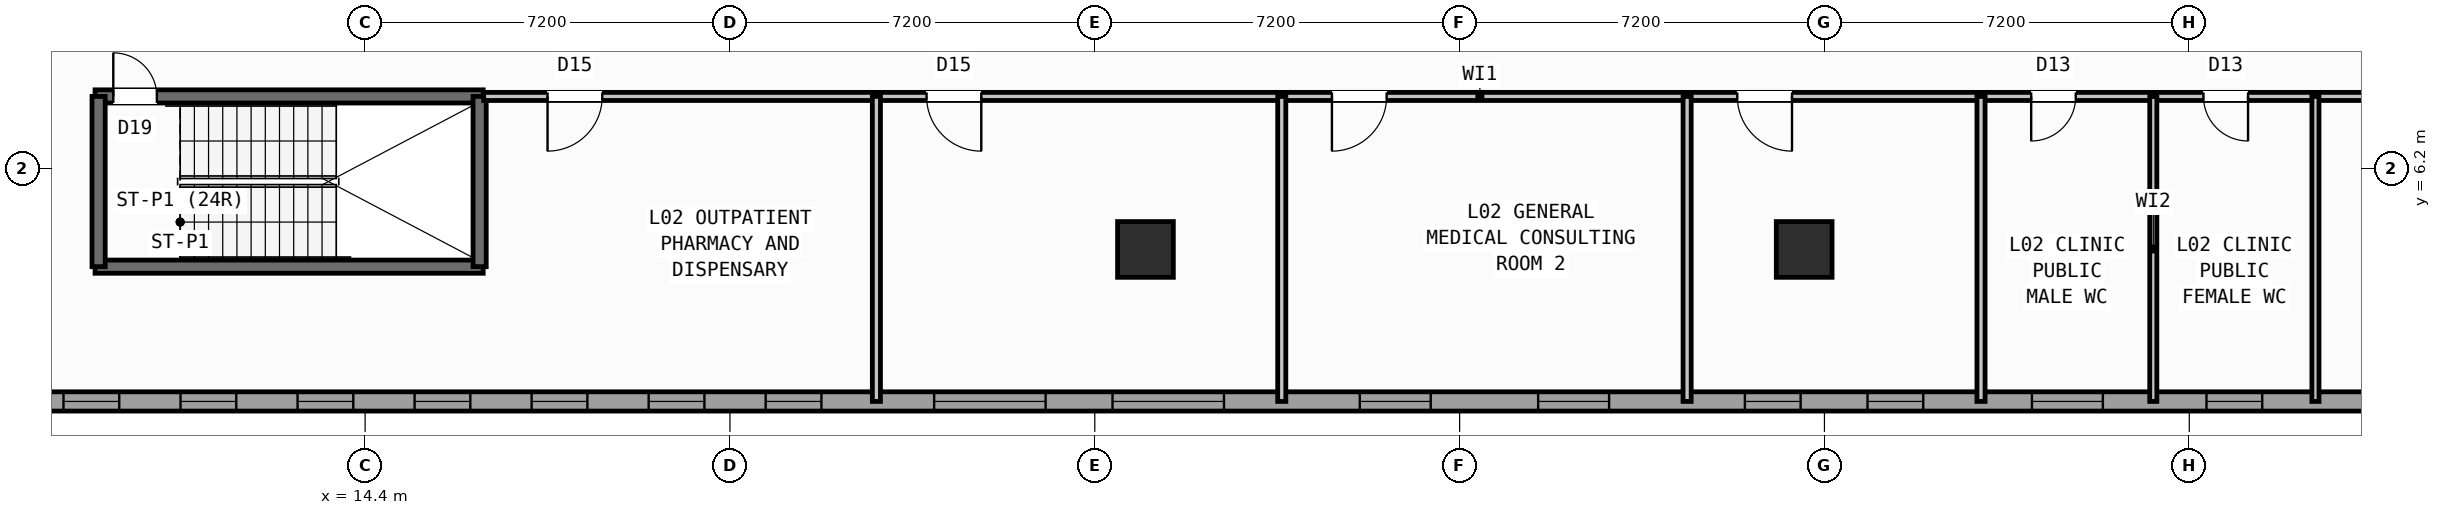
"""IFC4 building model, lengths in metres.
Left out: names, types, materials, properties, quantities, classifications, styles, units other than length and angle.
Written with IfcOpenShell. Run it as: python <this file> out.ifc"""

import sys

from ifc_helpers import new_model, si_unit, direction, frame, frame_2d, origin, origin_2d, place, context, subcontext, project, spatial, rectangle, hollow_rectangle, extrude, source, transform, mapped, element, fill, save


model = new_model("IFC4")
c1 = context("Model", 3, precision=1e-05, world=origin(), true_north=direction((0.0, 1.0)))
c2 = subcontext(c1, "Body", "Model", "MODEL_VIEW")
j1 = project(units=[si_unit("LENGTHUNIT", "METRE"), si_unit("PLANEANGLEUNIT", "RADIAN")], contexts=[c1])
p1 = place(None, origin())
s1 = spatial("IfcSite", under=j1, at=p1, CompositionType="ELEMENT")
p2 = place(p1, origin())
s2 = spatial("IfcBuilding", under=s1, at=p2, CompositionType="ELEMENT")
p3 = place(p2, frame((0.0, 0.0, 10.2)))
s3 = spatial("IfcBuildingStorey", under=s2, at=p3, CompositionType="ELEMENT", Elevation=10.2)
m1 = source(origin(), c2, "Body", "SweptSolid", [
    extrude(hollow_rectangle(XDim=1.1, YDim=1.1, WallThickness=0.04, at=origin_2d()), origin(), (0.0, 0.0, 1.0), 4.2),
])
for number, where, z_axis, x_axis in (
    (1, (29.8, 4.6, 0.0), (0.0, 0.0, 1.0), (1.0, 0.0, 0.0)),
    (2, (42.8, 4.6, 0.0), (0.0, 0.0, 1.0), (1.0, 0.0, 0.0)),
):
    element("IfcColumn", number, at=place(p3, frame(where, z_axis=z_axis, x_axis=x_axis)), inside=s3, PredefinedType="COLUMN", context=c2, shape_type="MappedRepresentation", body=[
        mapped(m1, transform((0.0, 0.0, 0.0), scale=1.0)),
    ])
p4 = place(p3, frame((67.117, 1.6, 0.0), z_axis=(0.0, 0.0, 1.0), x_axis=(-1.0, 0.0, 0.0)))
e3 = element("IfcWall", 3, at=p4, inside=s3, PredefinedType="STANDARD", context=c2, shape_type="SweptSolid", body=[
    extrude(rectangle(XDim=62.234, YDim=0.38, at=frame_2d((31.117, 0.0))), origin(), (0.0, 0.0, 1.0), 3.85),
])
p5 = place(p4, frame((1.735, 0.0, 0.85)))
e4 = element("IfcOpeningElement", 4, at=p5, cuts=e3, PredefinedType="OPENING", context=c2, shape_type="SweptSolid", body=[
    extrude(rectangle(XDim=2.2, YDim=1.75, at=frame_2d((1.1, 0.875))), frame((0.0, 0.2, 0.0), z_axis=(0.0, -1.0, 0.0), x_axis=(1.0, 0.0, 0.0)), (0.0, 0.0, 1.0), 0.4),
])
p6 = place(p4, frame((6.104, 0.0, 0.85)))
e5 = element("IfcOpeningElement", 5, at=p6, cuts=e3, PredefinedType="OPENING", context=c2, shape_type="SweptSolid", body=[
    extrude(rectangle(XDim=2.2, YDim=1.75, at=frame_2d((1.1, 0.875))), frame((0.0, 0.2, 0.0), z_axis=(0.0, -1.0, 0.0), x_axis=(1.0, 0.0, 0.0)), (0.0, 0.0, 1.0), 0.4),
])
p7 = place(p4, frame((10.473, 0.0, 0.85)))
e6 = element("IfcOpeningElement", 6, at=p7, cuts=e3, PredefinedType="OPENING", context=c2, shape_type="SweptSolid", body=[
    extrude(rectangle(XDim=2.2, YDim=1.75, at=frame_2d((1.1, 0.875))), frame((0.0, 0.2, 0.0), z_axis=(0.0, -1.0, 0.0), x_axis=(1.0, 0.0, 0.0)), (0.0, 0.0, 1.0), 0.4),
])
p8 = place(p4, frame((15.277, 0.0, 1.0)))
e7 = element("IfcOpeningElement", 7, at=p8, cuts=e3, PredefinedType="OPENING", context=c2, shape_type="SweptSolid", body=[
    extrude(rectangle(XDim=1.1, YDim=1.35, at=frame_2d((0.55, 0.675))), frame((0.0, 0.2, 0.0), z_axis=(0.0, -1.0, 0.0), x_axis=(1.0, 0.0, 0.0)), (0.0, 0.0, 1.0), 0.4),
])
p9 = place(p4, frame((18.422, 0.0, 0.95)))
e8 = element("IfcOpeningElement", 8, at=p9, cuts=e3, PredefinedType="OPENING", context=c2, shape_type="SweptSolid", body=[
    extrude(rectangle(XDim=1.4, YDim=1.5, at=frame_2d((0.7, 0.75))), frame((0.0, 0.2, 0.0), z_axis=(0.0, -1.0, 0.0), x_axis=(1.0, 0.0, 0.0)), (0.0, 0.0, 1.0), 0.4),
])
p10 = place(p4, frame((21.967, 0.0, 1.0)))
e9 = element("IfcOpeningElement", 9, at=p10, cuts=e3, PredefinedType="OPENING", context=c2, shape_type="SweptSolid", body=[
    extrude(rectangle(XDim=1.1, YDim=1.35, at=frame_2d((0.55, 0.675))), frame((0.0, 0.2, 0.0), z_axis=(0.0, -1.0, 0.0), x_axis=(1.0, 0.0, 0.0)), (0.0, 0.0, 1.0), 0.4),
])
p11 = place(p4, frame((24.387, 0.0, 1.0)))
e10 = element("IfcOpeningElement", 10, at=p11, cuts=e3, PredefinedType="OPENING", context=c2, shape_type="SweptSolid", body=[
    extrude(rectangle(XDim=1.1, YDim=1.35, at=frame_2d((0.55, 0.675))), frame((0.0, 0.2, 0.0), z_axis=(0.0, -1.0, 0.0), x_axis=(1.0, 0.0, 0.0)), (0.0, 0.0, 1.0), 0.4),
])
p12 = place(p4, frame((28.167, 0.0, 0.95)))
e11 = element("IfcOpeningElement", 11, at=p12, cuts=e3, PredefinedType="OPENING", context=c2, shape_type="SweptSolid", body=[
    extrude(rectangle(XDim=1.4, YDim=1.5, at=frame_2d((0.7, 0.75))), frame((0.0, 0.2, 0.0), z_axis=(0.0, -1.0, 0.0), x_axis=(1.0, 0.0, 0.0)), (0.0, 0.0, 1.0), 0.4),
])
p13 = place(p4, frame((31.687, 0.0, 0.95)))
e12 = element("IfcOpeningElement", 12, at=p13, cuts=e3, PredefinedType="OPENING", context=c2, shape_type="SweptSolid", body=[
    extrude(rectangle(XDim=1.4, YDim=1.5, at=frame_2d((0.7, 0.75))), frame((0.0, 0.2, 0.0), z_axis=(0.0, -1.0, 0.0), x_axis=(1.0, 0.0, 0.0)), (0.0, 0.0, 1.0), 0.4),
])
p14 = place(p4, frame((35.767, 0.0, 0.85)))
e13 = element("IfcOpeningElement", 13, at=p14, cuts=e3, PredefinedType="OPENING", context=c2, shape_type="SweptSolid", body=[
    extrude(rectangle(XDim=2.2, YDim=1.75, at=frame_2d((1.1, 0.875))), frame((0.0, 0.2, 0.0), z_axis=(0.0, -1.0, 0.0), x_axis=(1.0, 0.0, 0.0)), (0.0, 0.0, 1.0), 0.4),
])
p15 = place(p4, frame((39.287, 0.0, 0.85)))
e14 = element("IfcOpeningElement", 14, at=p15, cuts=e3, PredefinedType="OPENING", context=c2, shape_type="SweptSolid", body=[
    extrude(rectangle(XDim=2.2, YDim=1.75, at=frame_2d((1.1, 0.875))), frame((0.0, 0.2, 0.0), z_axis=(0.0, -1.0, 0.0), x_axis=(1.0, 0.0, 0.0)), (0.0, 0.0, 1.0), 0.4),
])
p16 = place(p4, frame((43.712, 0.0, 1.0)))
e15 = element("IfcOpeningElement", 15, at=p16, cuts=e3, PredefinedType="OPENING", context=c2, shape_type="SweptSolid", body=[
    extrude(rectangle(XDim=1.1, YDim=1.35, at=frame_2d((0.55, 0.675))), frame((0.0, 0.2, 0.0), z_axis=(0.0, -1.0, 0.0), x_axis=(1.0, 0.0, 0.0)), (0.0, 0.0, 1.0), 0.4),
])
p17 = place(p4, frame((46.021, 0.0, 1.0)))
e16 = element("IfcOpeningElement", 16, at=p17, cuts=e3, PredefinedType="OPENING", context=c2, shape_type="SweptSolid", body=[
    extrude(rectangle(XDim=1.1, YDim=1.35, at=frame_2d((0.55, 0.675))), frame((0.0, 0.2, 0.0), z_axis=(0.0, -1.0, 0.0), x_axis=(1.0, 0.0, 0.0)), (0.0, 0.0, 1.0), 0.4),
])
p18 = place(p4, frame((48.331, 0.0, 1.0)))
e17 = element("IfcOpeningElement", 17, at=p18, cuts=e3, PredefinedType="OPENING", context=c2, shape_type="SweptSolid", body=[
    extrude(rectangle(XDim=1.1, YDim=1.35, at=frame_2d((0.55, 0.675))), frame((0.0, 0.2, 0.0), z_axis=(0.0, -1.0, 0.0), x_axis=(1.0, 0.0, 0.0)), (0.0, 0.0, 1.0), 0.4),
])
p19 = place(p4, frame((50.641, 0.0, 1.0)))
e18 = element("IfcOpeningElement", 18, at=p19, cuts=e3, PredefinedType="OPENING", context=c2, shape_type="SweptSolid", body=[
    extrude(rectangle(XDim=1.1, YDim=1.35, at=frame_2d((0.55, 0.675))), frame((0.0, 0.2, 0.0), z_axis=(0.0, -1.0, 0.0), x_axis=(1.0, 0.0, 0.0)), (0.0, 0.0, 1.0), 0.4),
])
p20 = place(p4, frame((52.951, 0.0, 1.0)))
e19 = element("IfcOpeningElement", 19, at=p20, cuts=e3, PredefinedType="OPENING", context=c2, shape_type="SweptSolid", body=[
    extrude(rectangle(XDim=1.1, YDim=1.35, at=frame_2d((0.55, 0.675))), frame((0.0, 0.2, 0.0), z_axis=(0.0, -1.0, 0.0), x_axis=(1.0, 0.0, 0.0)), (0.0, 0.0, 1.0), 0.4),
])
p21 = place(p4, frame((55.26, 0.0, 1.0)))
e20 = element("IfcOpeningElement", 20, at=p21, cuts=e3, PredefinedType="OPENING", context=c2, shape_type="SweptSolid", body=[
    extrude(rectangle(XDim=1.1, YDim=1.35, at=frame_2d((0.55, 0.675))), frame((0.0, 0.2, 0.0), z_axis=(0.0, -1.0, 0.0), x_axis=(1.0, 0.0, 0.0)), (0.0, 0.0, 1.0), 0.4),
])
p22 = place(p4, frame((57.57, 0.0, 1.0)))
e21 = element("IfcOpeningElement", 21, at=p22, cuts=e3, PredefinedType="OPENING", context=c2, shape_type="SweptSolid", body=[
    extrude(rectangle(XDim=1.1, YDim=1.35, at=frame_2d((0.55, 0.675))), frame((0.0, 0.2, 0.0), z_axis=(0.0, -1.0, 0.0), x_axis=(1.0, 0.0, 0.0)), (0.0, 0.0, 1.0), 0.4),
])
p23 = place(p4, frame((59.879, 0.0, 1.0)))
e22 = element("IfcOpeningElement", 22, at=p23, cuts=e3, PredefinedType="OPENING", context=c2, shape_type="SweptSolid", body=[
    extrude(rectangle(XDim=1.1, YDim=1.35, at=frame_2d((0.55, 0.675))), frame((0.0, 0.2, 0.0), z_axis=(0.0, -1.0, 0.0), x_axis=(1.0, 0.0, 0.0)), (0.0, 0.0, 1.0), 0.4),
])
p24 = place(p3, frame((9.07, 7.62, 0.0), z_axis=(0.0, 0.0, 1.0), x_axis=(1.0, 0.0, 0.0)))
e23 = element("IfcWall", 23, at=p24, inside=s3, PredefinedType="SHEAR", context=c2, shape_type="SweptSolid", body=[
    extrude(rectangle(XDim=7.66, YDim=0.26, at=frame_2d((3.83, 0.0))), origin(), (0.0, 0.0, 1.0), 4.0),
])
p25 = place(p24, frame((0.36, 0.0, 0.0)))
e24 = element("IfcOpeningElement", 24, at=p25, cuts=e23, PredefinedType="OPENING", context=c2, shape_type="SweptSolid", body=[
    extrude(rectangle(XDim=0.86, YDim=2.05, at=frame_2d((0.43, 1.025))), frame((0.0, 0.14, 0.0), z_axis=(0.0, -1.0, 0.0), x_axis=(1.0, 0.0, 0.0)), (0.0, 0.0, 1.0), 0.28),
])
p26 = place(p3, frame((9.07, 4.26, 0.0), z_axis=(0.0, 0.0, 1.0), x_axis=(1.0, 0.0, 0.0)))
e25 = element("IfcWall", 25, at=p26, inside=s3, PredefinedType="SHEAR", context=c2, shape_type="SweptSolid", body=[
    extrude(rectangle(XDim=7.66, YDim=0.26, at=frame_2d((3.83, 0.0))), origin(), (0.0, 0.0, 1.0), 4.0),
])
for number, where, z_axis, x_axis in (
    (26, (9.14, 4.26, 0.0), (0.0, 0.0, 1.0), (0.0, 1.0, 0.0)),
    (27, (16.66, 4.26, 0.0), (0.0, 0.0, 1.0), (0.0, 1.0, 0.0)),
):
    element("IfcWall", number, at=place(p3, frame(where, z_axis=z_axis, x_axis=x_axis)), inside=s3, PredefinedType="SHEAR", context=c2, shape_type="SweptSolid", body=[
        extrude(rectangle(XDim=3.36, YDim=0.26, at=frame_2d((1.68, 0.0))), origin(), (0.0, 0.0, 1.0), 4.0),
    ])
p27 = place(p3, frame((16.74, 7.62, 0.0), z_axis=(0.0, 0.0, 1.0), x_axis=(1.0, 0.0, 0.0)))
e28 = element("IfcWall", 28, at=p27, inside=s3, PredefinedType="PARTITIONING", context=c2, shape_type="SweptSolid", body=[
    extrude(rectangle(XDim=39.32, YDim=0.16, at=frame_2d((19.66, 0.0))), origin(), (0.0, 0.0, 1.0), 3.84),
])
p28 = place(p27, frame((1.26, 0.0, 0.0)))
e29 = element("IfcOpeningElement", 29, at=p28, cuts=e28, PredefinedType="OPENING", context=c2, shape_type="SweptSolid", body=[
    extrude(rectangle(XDim=1.08, YDim=2.15, at=frame_2d((0.54, 1.075))), frame((0.0, 0.09, 0.0), z_axis=(0.0, -1.0, 0.0), x_axis=(1.0, 0.0, 0.0)), (0.0, 0.0, 1.0), 0.18),
])
p29 = place(p27, frame((8.74, 0.0, 0.0)))
e30 = element("IfcOpeningElement", 30, at=p29, cuts=e28, PredefinedType="OPENING", context=c2, shape_type="SweptSolid", body=[
    extrude(rectangle(XDim=1.08, YDim=2.15, at=frame_2d((0.54, 1.075))), frame((0.0, 0.09, 0.0), z_axis=(0.0, -1.0, 0.0), x_axis=(1.0, 0.0, 0.0)), (0.0, 0.0, 1.0), 0.18),
])
p30 = place(p27, frame((16.74, 0.0, 0.0)))
e31 = element("IfcOpeningElement", 31, at=p30, cuts=e28, PredefinedType="OPENING", context=c2, shape_type="SweptSolid", body=[
    extrude(rectangle(XDim=1.08, YDim=2.15, at=frame_2d((0.54, 1.075))), frame((0.0, 0.09, 0.0), z_axis=(0.0, -1.0, 0.0), x_axis=(1.0, 0.0, 0.0)), (0.0, 0.0, 1.0), 0.18),
])
p31 = place(p27, frame((24.74, 0.0, 0.0)))
e32 = element("IfcOpeningElement", 32, at=p31, cuts=e28, PredefinedType="OPENING", context=c2, shape_type="SweptSolid", body=[
    extrude(rectangle(XDim=1.08, YDim=2.15, at=frame_2d((0.54, 1.075))), frame((0.0, 0.09, 0.0), z_axis=(0.0, -1.0, 0.0), x_axis=(1.0, 0.0, 0.0)), (0.0, 0.0, 1.0), 0.18),
])
p32 = place(p27, frame((30.54, 0.0, 0.0)))
e33 = element("IfcOpeningElement", 33, at=p32, cuts=e28, PredefinedType="OPENING", context=c2, shape_type="SweptSolid", body=[
    extrude(rectangle(XDim=0.88, YDim=2.08, at=frame_2d((0.44, 1.04))), frame((0.0, 0.09, 0.0), z_axis=(0.0, -1.0, 0.0), x_axis=(1.0, 0.0, 0.0)), (0.0, 0.0, 1.0), 0.18),
])
p33 = place(p27, frame((33.94, 0.0, 0.0)))
e34 = element("IfcOpeningElement", 34, at=p33, cuts=e28, PredefinedType="OPENING", context=c2, shape_type="SweptSolid", body=[
    extrude(rectangle(XDim=0.88, YDim=2.08, at=frame_2d((0.44, 1.04))), frame((0.0, 0.09, 0.0), z_axis=(0.0, -1.0, 0.0), x_axis=(1.0, 0.0, 0.0)), (0.0, 0.0, 1.0), 0.18),
])
p34 = place(p27, frame((37.14, 0.0, 0.0)))
e35 = element("IfcOpeningElement", 35, at=p34, cuts=e28, PredefinedType="OPENING", context=c2, shape_type="SweptSolid", body=[
    extrude(rectangle(XDim=0.96, YDim=2.08, at=frame_2d((0.48, 1.04))), frame((0.0, 0.09, 0.0), z_axis=(0.0, -1.0, 0.0), x_axis=(1.0, 0.0, 0.0)), (0.0, 0.0, 1.0), 0.18),
])
for number, where, z_axis, x_axis in (
    (36, (24.49, 1.6, 0.0), (0.0, 0.0, 1.0), (0.0, 1.0, 0.0)),
    (37, (32.49, 1.6, 0.0), (0.0, 0.0, 1.0), (0.0, 1.0, 0.0)),
    (38, (40.49, 1.6, 0.0), (0.0, 0.0, 1.0), (0.0, 1.0, 0.0)),
    (39, (46.29, 1.6, 0.0), (0.0, 0.0, 1.0), (0.0, 1.0, 0.0)),
):
    element("IfcWall", number, at=place(p3, frame(where, z_axis=z_axis, x_axis=x_axis)), inside=s3, PredefinedType="PARTITIONING", context=c2, shape_type="SweptSolid", body=[
        extrude(rectangle(XDim=6.02, YDim=0.16, at=frame_2d((3.01, 0.0))), origin(), (0.0, 0.0, 1.0), 3.84),
    ])
for number, where, z_axis, x_axis in (
    (40, (49.69, 1.6, 0.0), (0.0, 0.0, 1.0), (0.0, 1.0, 0.0)),
    (41, (52.89, 1.6, 0.0), (0.0, 0.0, 1.0), (0.0, 1.0, 0.0)),
):
    element("IfcWall", number, at=place(p3, frame(where, z_axis=z_axis, x_axis=x_axis)), inside=s3, PredefinedType="PLUMBINGWALL", context=c2, shape_type="SweptSolid", body=[
        extrude(rectangle(XDim=6.02, YDim=0.14, at=frame_2d((3.01, 0.0))), origin(), (0.0, 0.0, 1.0), 3.84),
    ])
m2 = source(origin(), c2, "Body", "SweptSolid", [
    extrude(rectangle(XDim=1.1, YDim=1.35, at=frame_2d((0.55, 0.675))), frame((0.0, 0.03, 0.0), z_axis=(0.0, -1.0, 0.0), x_axis=(1.0, 0.0, 0.0)), (0.0, 0.0, 1.0), 0.06),
])
p35 = place(p8, origin())
e42 = element("IfcWindow", 42, at=p35, inside=s3, PartitioningType="SINGLE_PANEL", PredefinedType="WINDOW", context=c2, shape_type="MappedRepresentation", body=[
    mapped(m2, transform((0.0, 0.0, 0.0), scale=1.0)),
])
fill(e7, e42)
m3 = source(origin(), c2, "Body", "SweptSolid", [
    extrude(rectangle(XDim=1.4, YDim=1.5, at=frame_2d((0.7, 0.75))), frame((0.0, 0.03, 0.0), z_axis=(0.0, -1.0, 0.0), x_axis=(1.0, 0.0, 0.0)), (0.0, 0.0, 1.0), 0.06),
])
p36 = place(p9, origin())
e43 = element("IfcWindow", 43, at=p36, inside=s3, PartitioningType="SINGLE_PANEL", PredefinedType="WINDOW", context=c2, shape_type="MappedRepresentation", body=[
    mapped(m3, transform((0.0, 0.0, 0.0), scale=1.0)),
])
fill(e8, e43)
p37 = place(p10, origin())
e44 = element("IfcWindow", 44, at=p37, inside=s3, PartitioningType="SINGLE_PANEL", PredefinedType="WINDOW", context=c2, shape_type="MappedRepresentation", body=[
    mapped(m2, transform((0.0, 0.0, 0.0), scale=1.0)),
])
fill(e9, e44)
p38 = place(p11, origin())
e45 = element("IfcWindow", 45, at=p38, inside=s3, PartitioningType="SINGLE_PANEL", PredefinedType="WINDOW", context=c2, shape_type="MappedRepresentation", body=[
    mapped(m2, transform((0.0, 0.0, 0.0), scale=1.0)),
])
fill(e10, e45)
p39 = place(p12, origin())
e46 = element("IfcWindow", 46, at=p39, inside=s3, PartitioningType="SINGLE_PANEL", PredefinedType="WINDOW", context=c2, shape_type="MappedRepresentation", body=[
    mapped(m3, transform((0.0, 0.0, 0.0), scale=1.0)),
])
fill(e11, e46)
p40 = place(p13, origin())
e47 = element("IfcWindow", 47, at=p40, inside=s3, PartitioningType="SINGLE_PANEL", PredefinedType="WINDOW", context=c2, shape_type="MappedRepresentation", body=[
    mapped(m3, transform((0.0, 0.0, 0.0), scale=1.0)),
])
fill(e12, e47)
m4 = source(origin(), c2, "Body", "SweptSolid", [
    extrude(rectangle(XDim=2.2, YDim=1.75, at=frame_2d((1.1, 0.875))), frame((0.0, 0.03, 0.0), z_axis=(0.0, -1.0, 0.0), x_axis=(1.0, 0.0, 0.0)), (0.0, 0.0, 1.0), 0.06),
])
p41 = place(p14, origin())
e48 = element("IfcWindow", 48, at=p41, inside=s3, PartitioningType="SINGLE_PANEL", PredefinedType="WINDOW", context=c2, shape_type="MappedRepresentation", body=[
    mapped(m4, transform((0.0, 0.0, 0.0), scale=1.0)),
])
fill(e13, e48)
p42 = place(p15, origin())
e49 = element("IfcWindow", 49, at=p42, inside=s3, PartitioningType="SINGLE_PANEL", PredefinedType="WINDOW", context=c2, shape_type="MappedRepresentation", body=[
    mapped(m4, transform((0.0, 0.0, 0.0), scale=1.0)),
])
fill(e14, e49)
p43 = place(p16, origin())
e50 = element("IfcWindow", 50, at=p43, inside=s3, PartitioningType="SINGLE_PANEL", PredefinedType="WINDOW", context=c2, shape_type="MappedRepresentation", body=[
    mapped(m2, transform((0.0, 0.0, 0.0), scale=1.0)),
])
fill(e15, e50)
p44 = place(p17, origin())
e51 = element("IfcWindow", 51, at=p44, inside=s3, PartitioningType="SINGLE_PANEL", PredefinedType="WINDOW", context=c2, shape_type="MappedRepresentation", body=[
    mapped(m2, transform((0.0, 0.0, 0.0), scale=1.0)),
])
fill(e16, e51)
p45 = place(p18, origin())
e52 = element("IfcWindow", 52, at=p45, inside=s3, PartitioningType="SINGLE_PANEL", PredefinedType="WINDOW", context=c2, shape_type="MappedRepresentation", body=[
    mapped(m2, transform((0.0, 0.0, 0.0), scale=1.0)),
])
fill(e17, e52)
p46 = place(p19, origin())
e53 = element("IfcWindow", 53, at=p46, inside=s3, PartitioningType="SINGLE_PANEL", PredefinedType="WINDOW", context=c2, shape_type="MappedRepresentation", body=[
    mapped(m2, transform((0.0, 0.0, 0.0), scale=1.0)),
])
fill(e18, e53)
p47 = place(p20, origin())
e54 = element("IfcWindow", 54, at=p47, inside=s3, PartitioningType="SINGLE_PANEL", PredefinedType="WINDOW", context=c2, shape_type="MappedRepresentation", body=[
    mapped(m2, transform((0.0, 0.0, 0.0), scale=1.0)),
])
fill(e19, e54)
p48 = place(p21, origin())
e55 = element("IfcWindow", 55, at=p48, inside=s3, PartitioningType="SINGLE_PANEL", PredefinedType="WINDOW", context=c2, shape_type="MappedRepresentation", body=[
    mapped(m2, transform((0.0, 0.0, 0.0), scale=1.0)),
])
fill(e20, e55)
p49 = place(p22, origin())
e56 = element("IfcWindow", 56, at=p49, inside=s3, PartitioningType="SINGLE_PANEL", PredefinedType="WINDOW", context=c2, shape_type="MappedRepresentation", body=[
    mapped(m2, transform((0.0, 0.0, 0.0), scale=1.0)),
])
fill(e21, e56)
m5 = source(origin(), c2, "Body", "SweptSolid", [
    extrude(rectangle(XDim=0.86, YDim=2.05, at=frame_2d((0.43, 1.025))), frame((0.0, 0.025, 0.0), z_axis=(0.0, -1.0, 0.0), x_axis=(1.0, 0.0, 0.0)), (0.0, 0.0, 1.0), 0.05),
])
p50 = place(p25, origin())
e57 = element("IfcDoor", 57, at=p50, inside=s3, OperationType="SINGLE_SWING_LEFT", PredefinedType="DOOR", context=c2, shape_type="MappedRepresentation", body=[
    mapped(m5, transform((0.0, 0.0, 0.0), scale=1.0)),
])
fill(e24, e57)
m6 = source(origin(), c2, "Body", "SweptSolid", [
    extrude(rectangle(XDim=1.08, YDim=2.15, at=frame_2d((0.54, 1.075))), frame((0.0, 0.025, 0.0), z_axis=(0.0, -1.0, 0.0), x_axis=(1.0, 0.0, 0.0)), (0.0, 0.0, 1.0), 0.05),
])
p51 = place(p28, frame((1.08, 0.0, 0.0), z_axis=(0.0, 0.0, 1.0), x_axis=(-1.0, 0.0, 0.0)))
e58 = element("IfcDoor", 58, at=p51, inside=s3, OperationType="SINGLE_SWING_RIGHT", PredefinedType="DOOR", context=c2, shape_type="MappedRepresentation", body=[
    mapped(m6, transform((0.0, 0.0, 0.0), scale=1.0)),
])
fill(e29, e58)
p52 = place(p29, frame((1.08, 0.0, 0.0), z_axis=(0.0, 0.0, 1.0), x_axis=(-1.0, 0.0, 0.0)))
e59 = element("IfcDoor", 59, at=p52, inside=s3, OperationType="SINGLE_SWING_LEFT", PredefinedType="DOOR", context=c2, shape_type="MappedRepresentation", body=[
    mapped(m6, transform((0.0, 0.0, 0.0), scale=1.0)),
])
fill(e30, e59)
p53 = place(p30, frame((1.08, 0.0, 0.0), z_axis=(0.0, 0.0, 1.0), x_axis=(-1.0, 0.0, 0.0)))
e60 = element("IfcDoor", 60, at=p53, inside=s3, OperationType="SINGLE_SWING_RIGHT", PredefinedType="DOOR", context=c2, shape_type="MappedRepresentation", body=[
    mapped(m6, transform((0.0, 0.0, 0.0), scale=1.0)),
])
fill(e31, e60)
p54 = place(p31, frame((1.08, 0.0, 0.0), z_axis=(0.0, 0.0, 1.0), x_axis=(-1.0, 0.0, 0.0)))
e61 = element("IfcDoor", 61, at=p54, inside=s3, OperationType="SINGLE_SWING_LEFT", PredefinedType="DOOR", context=c2, shape_type="MappedRepresentation", body=[
    mapped(m6, transform((0.0, 0.0, 0.0), scale=1.0)),
])
fill(e32, e61)
m7 = source(origin(), c2, "Body", "SweptSolid", [
    extrude(rectangle(XDim=0.88, YDim=2.08, at=frame_2d((0.44, 1.04))), frame((0.0, 0.025, 0.0), z_axis=(0.0, -1.0, 0.0), x_axis=(1.0, 0.0, 0.0)), (0.0, 0.0, 1.0), 0.05),
])
p55 = place(p32, frame((0.88, 0.0, 0.0), z_axis=(0.0, 0.0, 1.0), x_axis=(-1.0, 0.0, 0.0)))
e62 = element("IfcDoor", 62, at=p55, inside=s3, OperationType="SINGLE_SWING_RIGHT", PredefinedType="DOOR", context=c2, shape_type="MappedRepresentation", body=[
    mapped(m7, transform((0.0, 0.0, 0.0), scale=1.0)),
])
fill(e33, e62)
p56 = place(p33, frame((0.88, 0.0, 0.0), z_axis=(0.0, 0.0, 1.0), x_axis=(-1.0, 0.0, 0.0)))
e63 = element("IfcDoor", 63, at=p56, inside=s3, OperationType="SINGLE_SWING_LEFT", PredefinedType="DOOR", context=c2, shape_type="MappedRepresentation", body=[
    mapped(m7, transform((0.0, 0.0, 0.0), scale=1.0)),
])
fill(e34, e63)
save(model, sys.argv[1])
